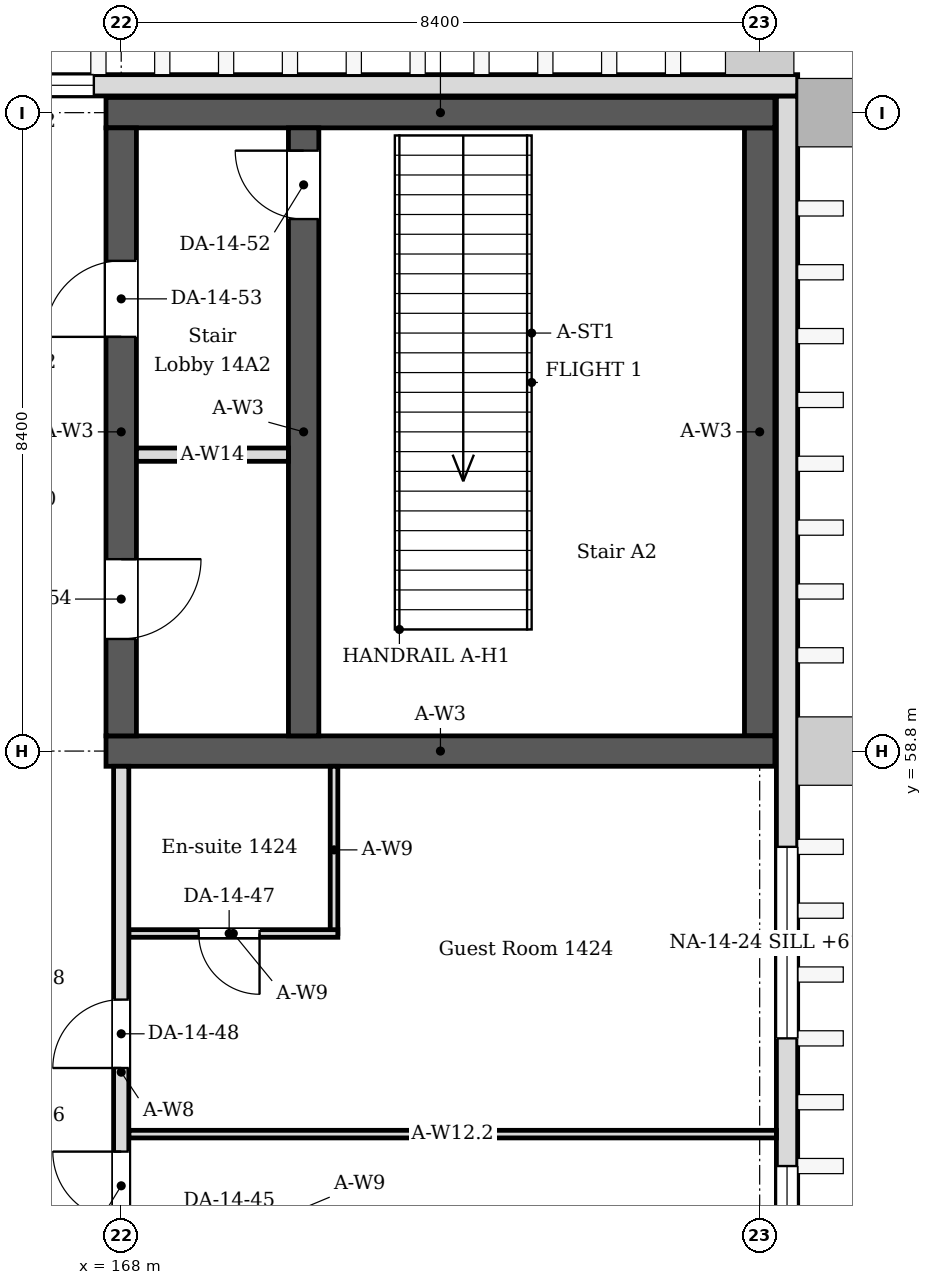
"""IFC4 building model, lengths in metres.
Left out: names, types, materials, properties, quantities, classifications, styles, units other than length and angle.
Written with IfcOpenShell. Run it as: python <this file> out.ifc"""

import sys

from ifc_helpers import new_model, si_unit, direction, frame, frame_2d, origin, place, context, subcontext, project, spatial, rectangle, extrude, element, fill, save


model = new_model("IFC4")
c1 = context("Model", 3, precision=1e-05, world=origin(), true_north=direction((0.0, 1.0)))
c2 = subcontext(c1, "Body", "Model", "MODEL_VIEW")
j1 = project(units=[si_unit("LENGTHUNIT", "METRE"), si_unit("PLANEANGLEUNIT", "RADIAN")], contexts=[c1])
p1 = place(None, origin())
s1 = spatial("IfcSite", under=j1, at=p1, CompositionType="ELEMENT")
p2 = place(p1, origin())
s2 = spatial("IfcBuilding", under=s1, at=p2, CompositionType="ELEMENT")
p3 = place(p2, frame((0.0, 0.0, 60.6)))
s3 = spatial("IfcBuildingStorey", under=s2, at=p3, CompositionType="ELEMENT", Elevation=60.6)
for number, where, z_axis, x_axis in (
    (1, (167.8, 58.8, 0.0), (0.0, 0.0, 1.0), (1.0, 0.0, 0.0)),
    (2, (167.8, 67.2, 0.0), (0.0, 0.0, 1.0), (1.0, 0.0, 0.0)),
):
    element("IfcWall", number, at=place(p3, frame(where, z_axis=z_axis, x_axis=x_axis)), inside=s3, PredefinedType="SOLIDWALL", context=c2, shape_type="SweptSolid", body=[
        extrude(rectangle(XDim=8.8, YDim=0.4, at=frame_2d((4.4, 0.0))), origin(), (0.0, 0.0, 1.0), 4.05),
    ])
p4 = place(p3, frame((168.0, 59.0, 0.0), z_axis=(0.0, 0.0, 1.0), x_axis=(0.0, 1.0, 0.0)))
e3 = element("IfcWall", 3, at=p4, inside=s3, PredefinedType="SOLIDWALL", context=c2, shape_type="SweptSolid", body=[
    extrude(rectangle(XDim=8.0, YDim=0.4, at=frame_2d((4.0, 0.0))), origin(), (0.0, 0.0, 1.0), 4.05),
])
p5 = place(p4, frame((5.25, 0.0, 0.0)))
e4 = element("IfcOpeningElement", 4, at=p5, cuts=e3, PredefinedType="OPENING", context=c2, shape_type="SweptSolid", body=[
    extrude(rectangle(XDim=1.0, YDim=2.1, at=frame_2d((0.5, 1.05))), frame((0.0, 0.21, 0.0), z_axis=(0.0, -1.0, 0.0), x_axis=(1.0, 0.0, 0.0)), (0.0, 0.0, 1.0), 0.42),
])
p6 = place(p4, frame((1.275, 0.0, 0.0)))
e5 = element("IfcOpeningElement", 5, at=p6, cuts=e3, PredefinedType="OPENING", context=c2, shape_type="SweptSolid", body=[
    extrude(rectangle(XDim=1.05, YDim=2.1, at=frame_2d((0.525, 1.05))), frame((0.0, 0.21, 0.0), z_axis=(0.0, -1.0, 0.0), x_axis=(1.0, 0.0, 0.0)), (0.0, 0.0, 1.0), 0.42),
])
p7 = place(p3, frame((176.4, 59.0, 0.0), z_axis=(0.0, 0.0, 1.0), x_axis=(0.0, 1.0, 0.0)))
e6 = element("IfcWall", 6, at=p7, inside=s3, PredefinedType="SOLIDWALL", context=c2, shape_type="SweptSolid", body=[
    extrude(rectangle(XDim=8.0, YDim=0.4, at=frame_2d((4.0, 0.0))), origin(), (0.0, 0.0, 1.0), 4.05),
])
p8 = place(p3, frame((176.76, -0.22, 0.0), z_axis=(0.0, 0.0, 1.0), x_axis=(0.0, 1.0, 0.0)))
e7 = element("IfcWall", 7, at=p8, inside=s3, PredefinedType="SOLIDWALL", context=c2, shape_type="SweptSolid", body=[
    extrude(rectangle(XDim=67.64, YDim=0.28, at=frame_2d((33.82, 0.0))), origin(), (0.0, 0.0, 1.0), 4.05),
])
p9 = place(p8, frame((9.88, 0.0, 0.45)))
e8 = element("IfcOpeningElement", 8, at=p9, cuts=e7, PredefinedType="OPENING", context=c2, shape_type="SweptSolid", body=[
    extrude(rectangle(XDim=2.52, YDim=2.1, at=frame_2d((1.26, 1.05))), frame((0.0, 0.15, 0.0), z_axis=(0.0, -1.0, 0.0), x_axis=(1.0, 0.0, 0.0)), (0.0, 0.0, 1.0), 0.3),
])
p10 = place(p8, frame((14.08, 0.0, 0.6)))
e9 = element("IfcOpeningElement", 9, at=p10, cuts=e7, PredefinedType="OPENING", context=c2, shape_type="SweptSolid", body=[
    extrude(rectangle(XDim=2.52, YDim=2.4, at=frame_2d((1.26, 1.2))), frame((0.0, 0.15, 0.0), z_axis=(0.0, -1.0, 0.0), x_axis=(1.0, 0.0, 0.0)), (0.0, 0.0, 1.0), 0.3),
])
p11 = place(p8, frame((17.86, 0.0, 0.6)))
e10 = element("IfcOpeningElement", 10, at=p11, cuts=e7, PredefinedType="OPENING", context=c2, shape_type="SweptSolid", body=[
    extrude(rectangle(XDim=2.52, YDim=2.4, at=frame_2d((1.26, 1.2))), frame((0.0, 0.15, 0.0), z_axis=(0.0, -1.0, 0.0), x_axis=(1.0, 0.0, 0.0)), (0.0, 0.0, 1.0), 0.3),
])
p12 = place(p8, frame((22.06, 0.0, 0.6)))
e11 = element("IfcOpeningElement", 11, at=p12, cuts=e7, PredefinedType="OPENING", context=c2, shape_type="SweptSolid", body=[
    extrude(rectangle(XDim=2.52, YDim=2.4, at=frame_2d((1.26, 1.2))), frame((0.0, 0.15, 0.0), z_axis=(0.0, -1.0, 0.0), x_axis=(1.0, 0.0, 0.0)), (0.0, 0.0, 1.0), 0.3),
])
p13 = place(p8, frame((42.64, 0.0, 0.6)))
e12 = element("IfcOpeningElement", 12, at=p13, cuts=e7, PredefinedType="OPENING", context=c2, shape_type="SweptSolid", body=[
    extrude(rectangle(XDim=2.52, YDim=2.4, at=frame_2d((1.26, 1.2))), frame((0.0, 0.15, 0.0), z_axis=(0.0, -1.0, 0.0), x_axis=(1.0, 0.0, 0.0)), (0.0, 0.0, 1.0), 0.3),
])
p14 = place(p8, frame((46.84, 0.0, 0.6)))
e13 = element("IfcOpeningElement", 13, at=p14, cuts=e7, PredefinedType="OPENING", context=c2, shape_type="SweptSolid", body=[
    extrude(rectangle(XDim=2.52, YDim=2.4, at=frame_2d((1.26, 1.2))), frame((0.0, 0.15, 0.0), z_axis=(0.0, -1.0, 0.0), x_axis=(1.0, 0.0, 0.0)), (0.0, 0.0, 1.0), 0.3),
])
p15 = place(p8, frame((51.04, 0.0, 0.6)))
e14 = element("IfcOpeningElement", 14, at=p15, cuts=e7, PredefinedType="OPENING", context=c2, shape_type="SweptSolid", body=[
    extrude(rectangle(XDim=2.52, YDim=2.4, at=frame_2d((1.26, 1.2))), frame((0.0, 0.15, 0.0), z_axis=(0.0, -1.0, 0.0), x_axis=(1.0, 0.0, 0.0)), (0.0, 0.0, 1.0), 0.3),
])
p16 = place(p8, frame((55.24, 0.0, 0.6)))
e15 = element("IfcOpeningElement", 15, at=p16, cuts=e7, PredefinedType="OPENING", context=c2, shape_type="SweptSolid", body=[
    extrude(rectangle(XDim=2.52, YDim=2.4, at=frame_2d((1.26, 1.2))), frame((0.0, 0.15, 0.0), z_axis=(0.0, -1.0, 0.0), x_axis=(1.0, 0.0, 0.0)), (0.0, 0.0, 1.0), 0.3),
])
p17 = place(p3, frame((156.7, 67.56, 0.0), z_axis=(0.0, 0.0, 1.0), x_axis=(1.0, 0.0, 0.0)))
e16 = element("IfcWall", 16, at=p17, inside=s3, PredefinedType="SOLIDWALL", context=c2, shape_type="SweptSolid", body=[
    extrude(rectangle(XDim=20.2, YDim=0.28, at=frame_2d((10.1, 0.0))), origin(), (0.0, 0.0, 1.0), 4.05),
])
p18 = place(p17, frame((9.26, 0.0, 0.6)))
e17 = element("IfcOpeningElement", 17, at=p18, cuts=e16, PredefinedType="OPENING", context=c2, shape_type="SweptSolid", body=[
    extrude(rectangle(XDim=1.68, YDim=2.4, at=frame_2d((0.84, 1.2))), frame((0.0, 0.15, 0.0), z_axis=(0.0, -1.0, 0.0), x_axis=(1.0, 0.0, 0.0)), (0.0, 0.0, 1.0), 0.3),
])
p19 = place(p17, frame((3.34, 0.0, 0.6)))
e18 = element("IfcOpeningElement", 18, at=p19, cuts=e16, PredefinedType="OPENING", context=c2, shape_type="SweptSolid", body=[
    extrude(rectangle(XDim=2.52, YDim=2.4, at=frame_2d((1.26, 1.2))), frame((0.0, 0.15, 0.0), z_axis=(0.0, -1.0, 0.0), x_axis=(1.0, 0.0, 0.0)), (0.0, 0.0, 1.0), 0.3),
])
p20 = place(p3, frame((170.8, 56.4, 0.0), z_axis=(0.0, 0.0, 1.0), x_axis=(0.0, 1.0, 0.0)))
e19 = element("IfcWall", 19, at=p20, inside=s3, PredefinedType="PARTITIONING", context=c2, shape_type="SweptSolid", body=[
    extrude(rectangle(XDim=2.2, YDim=0.1, at=frame_2d((1.1, 0.0))), origin(), (0.0, 0.0, 1.0), 4.05),
])
p21 = place(p3, frame((170.85, 56.4, 0.0), z_axis=(0.0, 0.0, 1.0), x_axis=(-1.0, 0.0, 0.0)))
e20 = element("IfcWall", 20, at=p21, inside=s3, PredefinedType="PARTITIONING", context=c2, shape_type="SweptSolid", body=[
    extrude(rectangle(XDim=2.75, YDim=0.1, at=frame_2d((1.375, 0.0))), origin(), (0.0, 0.0, 1.0), 4.05),
])
p22 = place(p21, frame((1.03, 0.0, 0.0)))
e21 = element("IfcOpeningElement", 21, at=p22, cuts=e20, PredefinedType="OPENING", context=c2, shape_type="SweptSolid", body=[
    extrude(rectangle(XDim=0.8, YDim=2.1, at=frame_2d((0.4, 1.05))), frame((0.0, 0.06, 0.0), z_axis=(0.0, -1.0, 0.0), x_axis=(1.0, 0.0, 0.0)), (0.0, 0.0, 1.0), 0.12),
])
p23 = place(p3, frame((168.1, 53.76, 0.0), z_axis=(0.0, 0.0, 1.0), x_axis=(1.0, 0.0, 0.0)))
e22 = element("IfcWall", 22, at=p23, inside=s3, PredefinedType="PARTITIONING", context=c2, shape_type="SweptSolid", body=[
    extrude(rectangle(XDim=8.52, YDim=0.1, at=frame_2d((4.26, 0.0))), origin(), (0.0, 0.0, 1.0), 3.55),
])
p24 = place(p3, frame((168.0, 50.55, 0.0), z_axis=(0.0, 0.0, 1.0), x_axis=(0.0, 1.0, 0.0)))
e23 = element("IfcWall", 23, at=p24, inside=s3, PredefinedType="PARTITIONING", context=c2, shape_type="SweptSolid", body=[
    extrude(rectangle(XDim=8.05, YDim=0.2, at=frame_2d((4.025, 0.0))), origin(), (0.0, 0.0, 1.0), 3.45),
])
p25 = place(p24, frame((2.08, 0.0, 0.0)))
e24 = element("IfcOpeningElement", 24, at=p25, cuts=e23, PredefinedType="OPENING", context=c2, shape_type="SweptSolid", body=[
    extrude(rectangle(XDim=0.9, YDim=2.1, at=frame_2d((0.45, 1.05))), frame((0.0, 0.11, 0.0), z_axis=(0.0, -1.0, 0.0), x_axis=(1.0, 0.0, 0.0)), (0.0, 0.0, 1.0), 0.22),
])
p26 = place(p24, frame((4.08, 0.0, 0.0)))
e25 = element("IfcOpeningElement", 25, at=p26, cuts=e23, PredefinedType="OPENING", context=c2, shape_type="SweptSolid", body=[
    extrude(rectangle(XDim=0.9, YDim=2.1, at=frame_2d((0.45, 1.05))), frame((0.0, 0.11, 0.0), z_axis=(0.0, -1.0, 0.0), x_axis=(1.0, 0.0, 0.0)), (0.0, 0.0, 1.0), 0.22),
])
p27 = place(p3, frame((170.4, 59.0, 0.0), z_axis=(0.0, 0.0, 1.0), x_axis=(0.0, 1.0, 0.0)))
e26 = element("IfcWall", 26, at=p27, inside=s3, PredefinedType="SOLIDWALL", context=c2, shape_type="SweptSolid", body=[
    extrude(rectangle(XDim=8.0, YDim=0.4, at=frame_2d((4.0, 0.0))), origin(), (0.0, 0.0, 1.0), 4.05),
])
p28 = place(p27, frame((6.8, 0.0, 0.0)))
e27 = element("IfcOpeningElement", 27, at=p28, cuts=e26, PredefinedType="OPENING", context=c2, shape_type="SweptSolid", body=[
    extrude(rectangle(XDim=0.9, YDim=2.1, at=frame_2d((0.45, 1.05))), frame((0.0, 0.21, 0.0), z_axis=(0.0, -1.0, 0.0), x_axis=(1.0, 0.0, 0.0)), (0.0, 0.0, 1.0), 0.42),
])
p29 = place(p3, frame((168.2, 62.7, 0.0), z_axis=(0.0, 0.0, 1.0), x_axis=(1.0, 0.0, 0.0)))
e28 = element("IfcWall", 28, at=p29, inside=s3, PredefinedType="PARTITIONING", context=c2, shape_type="SweptSolid", body=[
    extrude(rectangle(XDim=2.0, YDim=0.175, at=frame_2d((1.0, 0.0))), origin(), (0.0, 0.0, 1.0), 4.05),
])
p30 = place(p15, origin())
e29 = element("IfcWindow", 29, at=p30, inside=s3, PartitioningType="SINGLE_PANEL", PredefinedType="WINDOW", context=c2, shape_type="SweptSolid", body=[
    extrude(rectangle(XDim=2.52, YDim=2.4, at=frame_2d((1.26, 1.2))), frame((0.0, 0.03, 0.0), z_axis=(0.0, -1.0, 0.0), x_axis=(1.0, 0.0, 0.0)), (0.0, 0.0, 1.0), 0.06),
])
fill(e14, e29)
p31 = place(p16, origin())
e30 = element("IfcWindow", 30, at=p31, inside=s3, PartitioningType="SINGLE_PANEL", PredefinedType="WINDOW", context=c2, shape_type="SweptSolid", body=[
    extrude(rectangle(XDim=2.52, YDim=2.4, at=frame_2d((1.26, 1.2))), frame((0.0, 0.03, 0.0), z_axis=(0.0, -1.0, 0.0), x_axis=(1.0, 0.0, 0.0)), (0.0, 0.0, 1.0), 0.06),
])
fill(e15, e30)
p32 = place(p18, origin())
e31 = element("IfcWindow", 31, at=p32, inside=s3, PartitioningType="SINGLE_PANEL", PredefinedType="WINDOW", context=c2, shape_type="SweptSolid", body=[
    extrude(rectangle(XDim=1.68, YDim=2.4, at=frame_2d((0.84, 1.2))), frame((0.0, 0.03, 0.0), z_axis=(0.0, -1.0, 0.0), x_axis=(1.0, 0.0, 0.0)), (0.0, 0.0, 1.0), 0.06),
])
fill(e17, e31)
p33 = place(p25, origin())
e32 = element("IfcDoor", 32, at=p33, inside=s3, OperationType="SINGLE_SWING_RIGHT", PredefinedType="DOOR", context=c2, shape_type="SweptSolid", body=[
    extrude(rectangle(XDim=0.9, YDim=2.1, at=frame_2d((0.45, 1.05))), frame((0.0, 0.025, 0.0), z_axis=(0.0, -1.0, 0.0), x_axis=(1.0, 0.0, 0.0)), (0.0, 0.0, 1.0), 0.05),
])
fill(e24, e32)
p34 = place(p22, origin())
e33 = element("IfcDoor", 33, at=p34, inside=s3, OperationType="SINGLE_SWING_LEFT", PredefinedType="DOOR", context=c2, shape_type="SweptSolid", body=[
    extrude(rectangle(XDim=0.8, YDim=2.1, at=frame_2d((0.4, 1.05))), frame((0.0, 0.025, 0.0), z_axis=(0.0, -1.0, 0.0), x_axis=(1.0, 0.0, 0.0)), (0.0, 0.0, 1.0), 0.05),
])
fill(e21, e33)
p35 = place(p26, origin())
e34 = element("IfcDoor", 34, at=p35, inside=s3, OperationType="SINGLE_SWING_LEFT", PredefinedType="DOOR", context=c2, shape_type="SweptSolid", body=[
    extrude(rectangle(XDim=0.9, YDim=2.1, at=frame_2d((0.45, 1.05))), frame((0.0, 0.025, 0.0), z_axis=(0.0, -1.0, 0.0), x_axis=(1.0, 0.0, 0.0)), (0.0, 0.0, 1.0), 0.05),
])
fill(e25, e34)
p36 = place(p28, origin())
e35 = element("IfcDoor", 35, at=p36, inside=s3, OperationType="SINGLE_SWING_RIGHT", PredefinedType="DOOR", context=c2, shape_type="SweptSolid", body=[
    extrude(rectangle(XDim=0.9, YDim=2.1, at=frame_2d((0.45, 1.05))), frame((0.0, 0.025, 0.0), z_axis=(0.0, -1.0, 0.0), x_axis=(1.0, 0.0, 0.0)), (0.0, 0.0, 1.0), 0.05),
])
fill(e27, e35)
p37 = place(p5, origin())
e36 = element("IfcDoor", 36, at=p37, inside=s3, OperationType="SINGLE_SWING_LEFT", PredefinedType="DOOR", context=c2, shape_type="SweptSolid", body=[
    extrude(rectangle(XDim=1.0, YDim=2.1, at=frame_2d((0.5, 1.05))), frame((0.0, 0.025, 0.0), z_axis=(0.0, -1.0, 0.0), x_axis=(1.0, 0.0, 0.0)), (0.0, 0.0, 1.0), 0.05),
])
fill(e4, e36)
p38 = place(p6, origin())
e37 = element("IfcDoor", 37, at=p38, inside=s3, OperationType="SINGLE_SWING_RIGHT", PredefinedType="DOOR", context=c2, shape_type="SweptSolid", body=[
    extrude(rectangle(XDim=1.05, YDim=2.1, at=frame_2d((0.525, 1.05))), frame((0.0, 0.025, 0.0), z_axis=(0.0, -1.0, 0.0), x_axis=(1.0, 0.0, 0.0)), (0.0, 0.0, 1.0), 0.05),
])
fill(e5, e37)
save(model, sys.argv[1])
